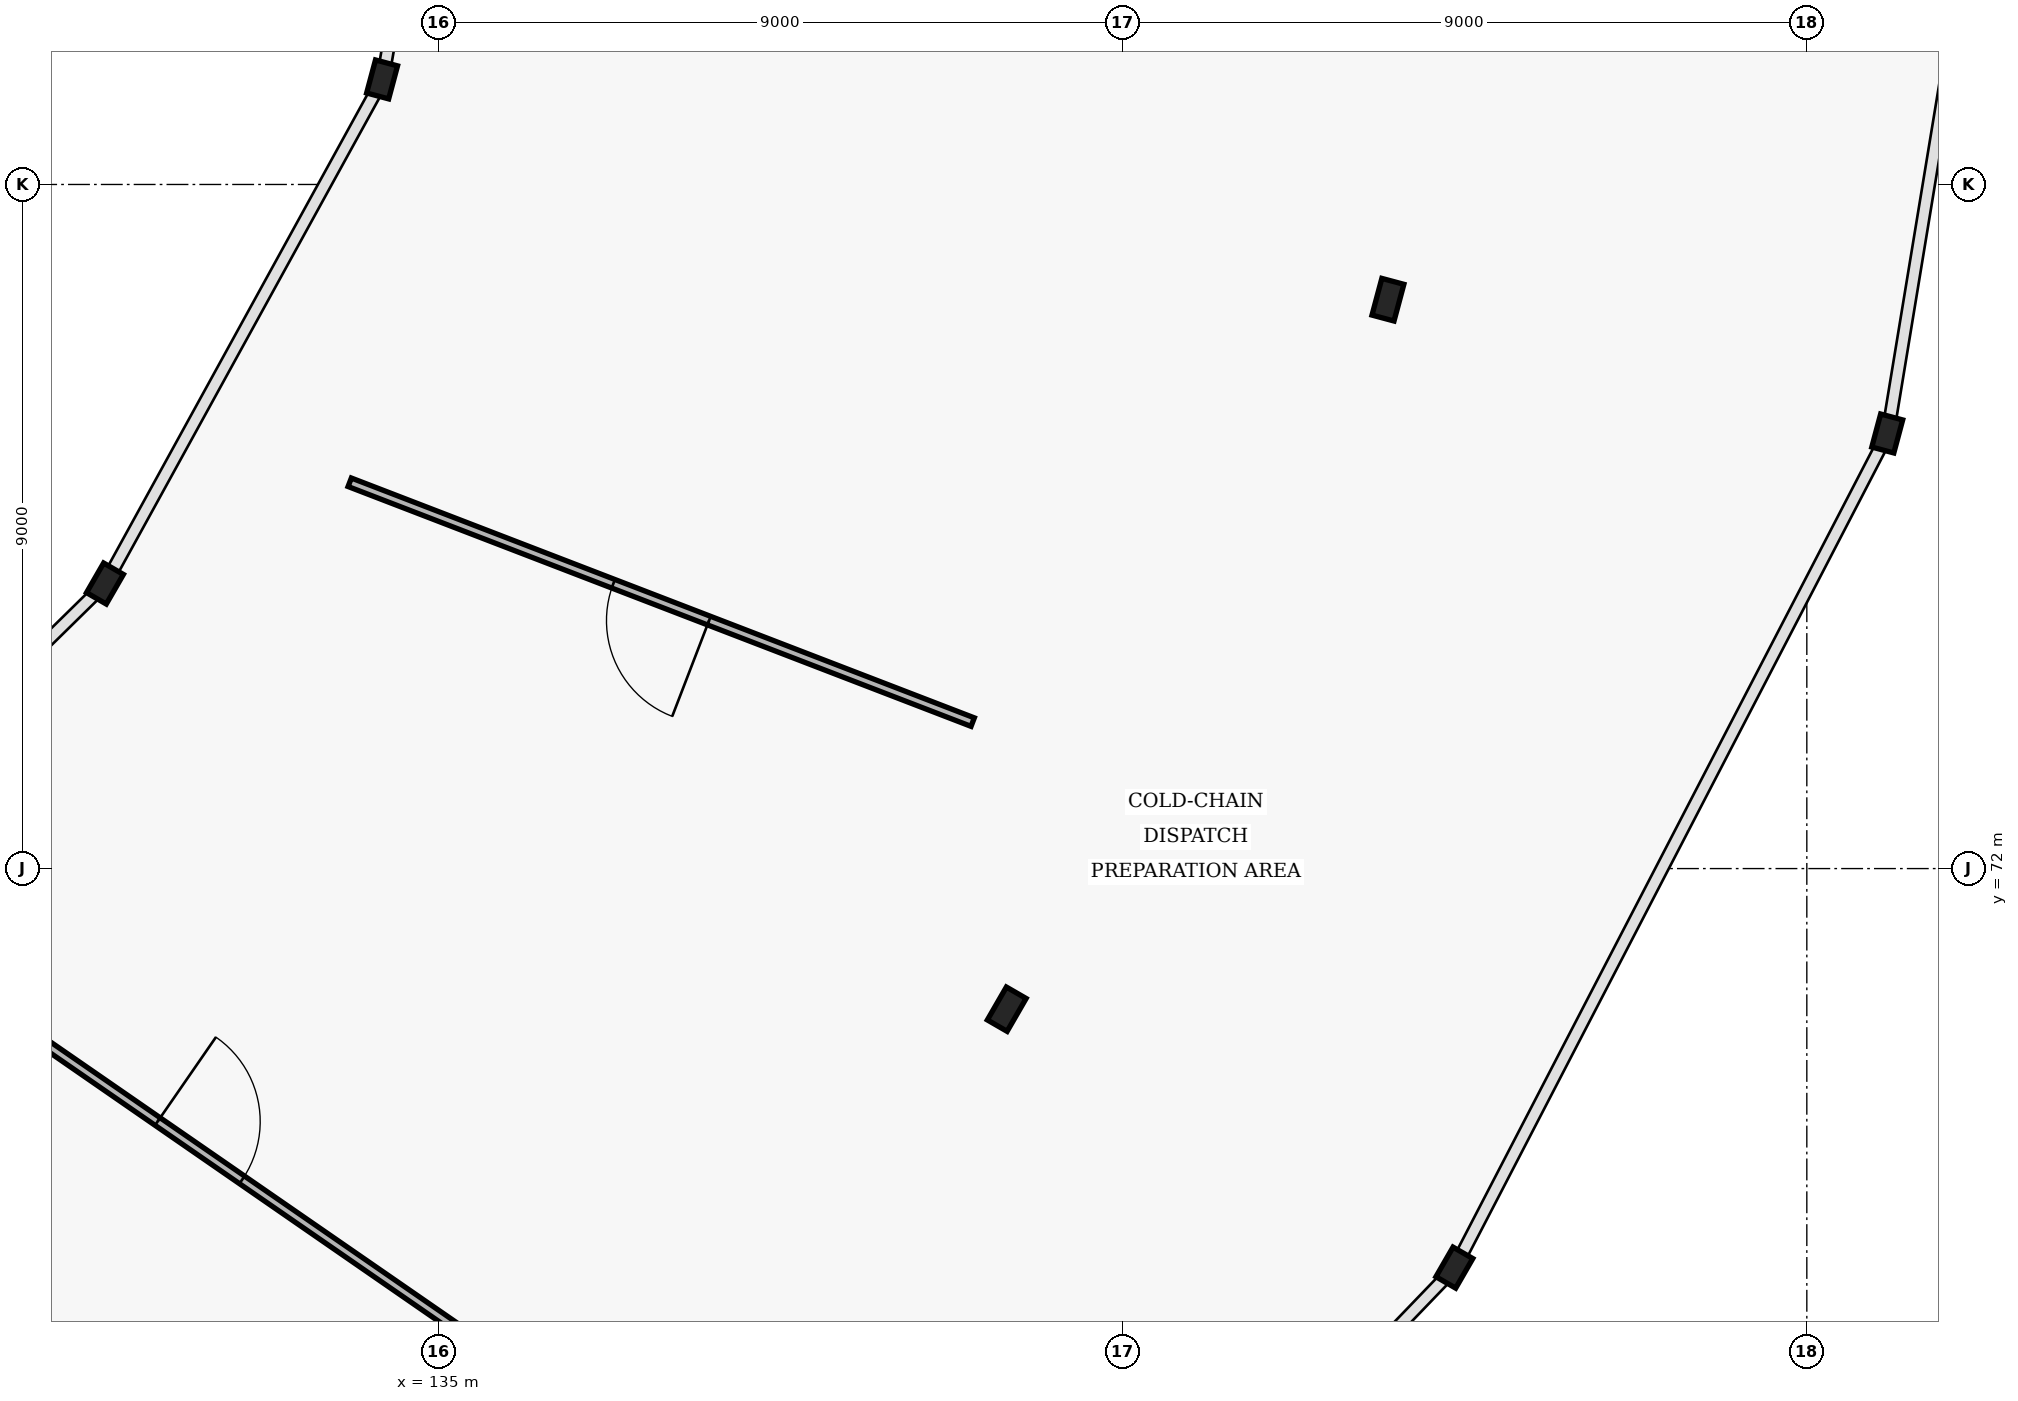
"""IFC4 building model, lengths in metres.
Left out: names, types, materials, properties, quantities, classifications, styles, units other than length and angle.
Written with IfcOpenShell. Run it as: python <this file> out.ifc"""

import sys

from ifc_helpers import new_model, si_unit, direction, frame, frame_2d, origin, origin_2d, place, context, subcontext, project, spatial, rectangle, i_section, extrude, element, fill, save


model = new_model("IFC4")
c1 = context("Model", 3, precision=1e-05, world=origin(), true_north=direction((0.0, 1.0)))
c2 = subcontext(c1, "Body", "Model", "MODEL_VIEW")
j1 = project(units=[si_unit("LENGTHUNIT", "METRE"), si_unit("PLANEANGLEUNIT", "RADIAN")], contexts=[c1])
p1 = place(None, origin())
s1 = spatial("IfcSite", under=j1, at=p1, CompositionType="ELEMENT")
p2 = place(p1, origin())
s2 = spatial("IfcBuilding", under=s1, at=p2, CompositionType="ELEMENT")
p3 = place(p2, frame((0.0, 0.0, 5.4)))
s3 = spatial("IfcBuildingStorey", under=s2, at=p3, CompositionType="ELEMENT", Elevation=5.4)
p4 = place(p3, frame((130.61, 75.75, 0.0), z_axis=(0.0, 0.0, 1.0), x_axis=(0.866025403784, -0.5, 0.0)))
e1 = element("IfcColumn", 1, at=p4, inside=s3, PredefinedType="COLUMN", context=c2, shape_type="SweptSolid", body=[
    extrude(i_section(OverallWidth=0.3, OverallDepth=0.45, WebThickness=0.014, FlangeThickness=0.026, FilletRadius=0.027, at=origin_2d()), origin(), (0.0, 0.0, 1.0), 4.2),
])
p5 = place(p3, frame((142.474, 70.15, 0.0), z_axis=(0.0, 0.0, 1.0), x_axis=(0.866025403784, -0.5, 0.0)))
e2 = element("IfcColumn", 2, at=p5, inside=s3, PredefinedType="COLUMN", context=c2, shape_type="SweptSolid", body=[
    extrude(i_section(OverallWidth=0.3, OverallDepth=0.5, WebThickness=0.014, FlangeThickness=0.028, FilletRadius=0.027, at=origin_2d()), origin(), (0.0, 0.0, 1.0), 4.2),
])
p6 = place(p3, frame((148.363, 66.75, 0.0), z_axis=(0.0, 0.0, 1.0), x_axis=(0.866025403784, -0.5, 0.0)))
e3 = element("IfcColumn", 3, at=p6, inside=s3, PredefinedType="COLUMN", context=c2, shape_type="SweptSolid", body=[
    extrude(i_section(OverallWidth=0.3, OverallDepth=0.45, WebThickness=0.014, FlangeThickness=0.026, FilletRadius=0.027, at=origin_2d()), origin(), (0.0, 0.0, 1.0), 4.18),
])
p7 = place(p3, frame((134.256, 82.382, 0.0), z_axis=(0.0, 0.0, 1.0), x_axis=(0.965925826289, -0.258819045103, 0.0)))
e4 = element("IfcColumn", 4, at=p7, inside=s3, PredefinedType="COLUMN", context=c2, shape_type="SweptSolid", body=[
    extrude(i_section(OverallWidth=0.3, OverallDepth=0.45, WebThickness=0.014, FlangeThickness=0.026, FilletRadius=0.027, at=origin_2d()), origin(), (0.0, 0.0, 1.0), 4.2),
])
p8 = place(p3, frame((147.489, 79.484, 0.0), z_axis=(0.0, 0.0, 1.0), x_axis=(0.965925826289, -0.258819045103, 0.0)))
e5 = element("IfcColumn", 5, at=p8, inside=s3, PredefinedType="COLUMN", context=c2, shape_type="SweptSolid", body=[
    extrude(i_section(OverallWidth=0.3, OverallDepth=0.5, WebThickness=0.014, FlangeThickness=0.028, FilletRadius=0.027, at=origin_2d()), origin(), (0.0, 0.0, 1.0), 4.2),
])
p9 = place(p3, frame((154.058, 77.724, 0.0), z_axis=(0.0, 0.0, 1.0), x_axis=(0.965925826289, -0.258819045103, 0.0)))
e6 = element("IfcColumn", 6, at=p9, inside=s3, PredefinedType="COLUMN", context=c2, shape_type="SweptSolid", body=[
    extrude(i_section(OverallWidth=0.3, OverallDepth=0.45, WebThickness=0.014, FlangeThickness=0.026, FilletRadius=0.027, at=origin_2d()), origin(), (0.0, 0.0, 1.0), 4.18),
])
p10 = place(p3, frame((128.475, 70.626, 0.0), z_axis=(0.0, 0.0, 1.0), x_axis=(0.822666462931, -0.568524309743, 0.0)))
e7 = element("IfcWall", 7, at=p10, inside=s3, PredefinedType="PARTITIONING", context=c2, shape_type="SweptSolid", body=[
    extrude(rectangle(XDim=8.223, YDim=0.12, at=frame_2d((4.112, 0.0))), origin(), (0.0, 0.0, 1.0), 3.2),
])
p11 = place(p10, frame((3.437, 0.0, 0.0)))
e8 = element("IfcOpeningElement", 8, at=p11, cuts=e7, PredefinedType="OPENING", context=c2, shape_type="SweptSolid", body=[
    extrude(rectangle(XDim=1.35, YDim=2.2, at=frame_2d((0.675, 1.1))), frame((0.0, 0.07, 0.0), z_axis=(0.0, -1.0, 0.0), x_axis=(1.0, 0.0, 0.0)), (0.0, 0.0, 1.0), 0.14),
])
p12 = place(p3, frame((133.83, 77.082, 0.0), z_axis=(0.0, 0.0, 1.0), x_axis=(0.933238808021, -0.359256631399, 0.0)))
e9 = element("IfcWall", 9, at=p12, inside=s3, PredefinedType="PARTITIONING", context=c2, shape_type="SweptSolid", body=[
    extrude(rectangle(XDim=8.782, YDim=0.12, at=frame_2d((4.391, 0.0))), origin(), (0.0, 0.0, 1.0), 3.2),
])
p13 = place(p12, frame((3.716, 0.0, 0.0)))
e10 = element("IfcOpeningElement", 10, at=p13, cuts=e9, PredefinedType="OPENING", context=c2, shape_type="SweptSolid", body=[
    extrude(rectangle(XDim=1.35, YDim=2.2, at=frame_2d((0.675, 1.1))), frame((0.0, 0.07, 0.0), z_axis=(0.0, -1.0, 0.0), x_axis=(1.0, 0.0, 0.0)), (0.0, 0.0, 1.0), 0.14),
])
p14 = place(p11, origin())
e11 = element("IfcDoor", 11, at=p14, inside=s3, OperationType="SINGLE_SWING_LEFT", PredefinedType="DOOR", context=c2, shape_type="SweptSolid", body=[
    extrude(rectangle(XDim=1.35, YDim=2.2, at=frame_2d((0.675, 1.1))), frame((0.0, 0.025, 0.0), z_axis=(0.0, -1.0, 0.0), x_axis=(1.0, 0.0, 0.0)), (0.0, 0.0, 1.0), 0.05),
])
fill(e8, e11)
p15 = place(p13, origin())
e12 = element("IfcDoor", 12, at=p15, inside=s3, OperationType="SINGLE_SWING_RIGHT", PredefinedType="DOOR", context=c2, shape_type="SweptSolid", body=[
    extrude(rectangle(XDim=1.35, YDim=2.2, at=frame_2d((0.675, 1.1))), frame((0.0, 0.025, 0.0), z_axis=(0.0, -1.0, 0.0), x_axis=(1.0, 0.0, 0.0)), (0.0, 0.0, 1.0), 0.05),
])
fill(e10, e12)
save(model, sys.argv[1])
